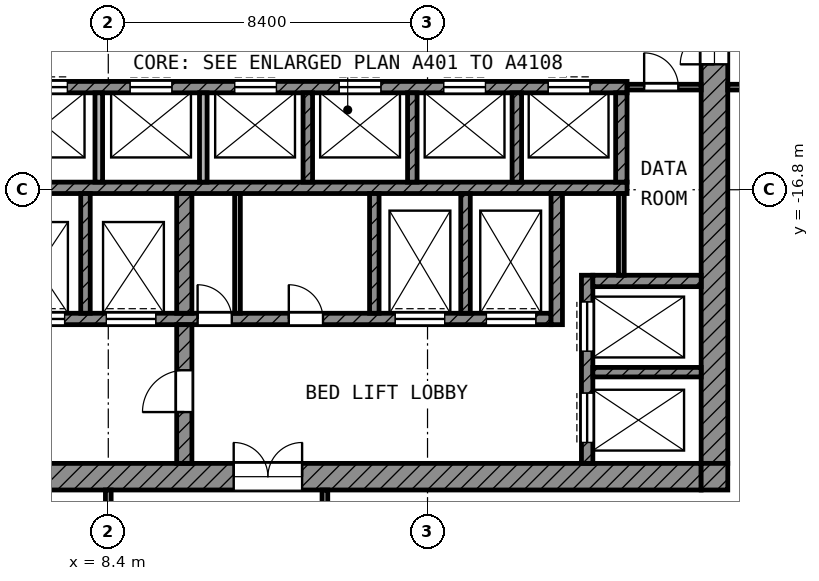
"""IFC4 building model, lengths in metres.
Left out: names, types, materials, properties, quantities, classifications, styles, units other than length and angle.
Written with IfcOpenShell. Run it as: python <this file> out.ifc"""

import sys

from ifc_helpers import new_model, si_unit, direction, frame, frame_2d, origin, place, context, subcontext, project, spatial, rectangle, extrude, element, fill, save


model = new_model("IFC4")
c1 = context("Model", 3, precision=1e-05, world=origin(), true_north=direction((0.0, 1.0)))
c2 = subcontext(c1, "Body", "Model", "MODEL_VIEW")
j1 = project(units=[si_unit("LENGTHUNIT", "METRE"), si_unit("PLANEANGLEUNIT", "RADIAN")], contexts=[c1])
p1 = place(None, origin())
s1 = spatial("IfcSite", under=j1, at=p1, CompositionType="ELEMENT")
p2 = place(p1, origin())
s2 = spatial("IfcBuilding", under=s1, at=p2, CompositionType="ELEMENT")
p3 = place(p2, frame((0.0, 0.0, 277.6)))
s3 = spatial("IfcBuildingStorey", under=s2, at=p3, CompositionType="ELEMENT", Elevation=277.6)
p4 = place(p3, frame((24.35, -24.0, 0.0), z_axis=(0.0, 0.0, 1.0), x_axis=(0.0, 1.0, 0.0)))
e1 = element("IfcWall", 1, at=p4, inside=s3, PredefinedType="SHEAR", context=c2, shape_type="SweptSolid", body=[
    extrude(rectangle(XDim=18.6, YDim=0.7, at=frame_2d((9.3, 0.0))), origin(), (0.0, 0.0, 1.0), 3.6),
])
p5 = place(p4, frame((10.5, 0.0, 0.0)))
e2 = element("IfcOpeningElement", 2, at=p5, cuts=e1, PredefinedType="OPENING", context=c2, shape_type="SweptSolid", body=[
    extrude(rectangle(XDim=1.8, YDim=2.1, at=frame_2d((0.9, 1.05))), frame((0.0, 0.36, 0.0), z_axis=(0.0, -1.0, 0.0), x_axis=(1.0, 0.0, 0.0)), (0.0, 0.0, 1.0), 0.72),
])
p6 = place(p3, frame((5.4, -24.35, 0.0), z_axis=(0.0, 0.0, 1.0), x_axis=(1.0, 0.0, 0.0)))
e3 = element("IfcWall", 3, at=p6, inside=s3, PredefinedType="SHEAR", context=c2, shape_type="SweptSolid", body=[
    extrude(rectangle(XDim=18.6, YDim=0.7, at=frame_2d((9.3, 0.0))), origin(), (0.0, 0.0, 1.0), 3.6),
])
p7 = place(p6, frame((6.3, 0.0, 0.0)))
e4 = element("IfcOpeningElement", 4, at=p7, cuts=e3, PredefinedType="OPENING", context=c2, shape_type="SweptSolid", body=[
    extrude(rectangle(XDim=1.8, YDim=2.1, at=frame_2d((0.9, 1.05))), frame((0.0, 0.36, 0.0), z_axis=(0.0, -1.0, 0.0), x_axis=(1.0, 0.0, 0.0)), (0.0, 0.0, 1.0), 0.72),
])
p8 = place(p3, frame((24.35, -24.7, 0.0), z_axis=(0.0, 0.0, 1.0), x_axis=(0.0, 1.0, 0.0)))
e5 = element("IfcWall", 5, at=p8, inside=s3, PredefinedType="SHEAR", context=c2, shape_type="SweptSolid", body=[
    extrude(rectangle(XDim=0.7, YDim=0.7, at=frame_2d((0.35, 0.0))), origin(), (0.0, 0.0, 1.0), 3.6),
])
p9 = place(p3, frame((5.4, -14.1, 0.0), z_axis=(0.0, 0.0, 1.0), x_axis=(1.0, 0.0, 0.0)))
e6 = element("IfcWall", 6, at=p9, inside=s3, PredefinedType="SHEAR", context=c2, shape_type="SweptSolid", body=[
    extrude(rectangle(XDim=16.65, YDim=0.3, at=frame_2d((8.325, 0.0))), origin(), (0.0, 0.0, 1.0), 3.6),
])
p10 = place(p9, frame((0.825, 0.0, 0.0)))
e7 = element("IfcOpeningElement", 7, at=p10, cuts=e6, PredefinedType="OPENING", context=c2, shape_type="SweptSolid", body=[
    extrude(rectangle(XDim=1.1, YDim=2.1, at=frame_2d((0.55, 1.05))), frame((0.0, 0.16, 0.0), z_axis=(0.0, -1.0, 0.0), x_axis=(1.0, 0.0, 0.0)), (0.0, 0.0, 1.0), 0.32),
])
p11 = place(p9, frame((3.575, 0.0, 0.0)))
e8 = element("IfcOpeningElement", 8, at=p11, cuts=e6, PredefinedType="OPENING", context=c2, shape_type="SweptSolid", body=[
    extrude(rectangle(XDim=1.1, YDim=2.1, at=frame_2d((0.55, 1.05))), frame((0.0, 0.16, 0.0), z_axis=(0.0, -1.0, 0.0), x_axis=(1.0, 0.0, 0.0)), (0.0, 0.0, 1.0), 0.32),
])
p12 = place(p9, frame((6.325, 0.0, 0.0)))
e9 = element("IfcOpeningElement", 9, at=p12, cuts=e6, PredefinedType="OPENING", context=c2, shape_type="SweptSolid", body=[
    extrude(rectangle(XDim=1.1, YDim=2.1, at=frame_2d((0.55, 1.05))), frame((0.0, 0.16, 0.0), z_axis=(0.0, -1.0, 0.0), x_axis=(1.0, 0.0, 0.0)), (0.0, 0.0, 1.0), 0.32),
])
p13 = place(p9, frame((9.075, 0.0, 0.0)))
e10 = element("IfcOpeningElement", 10, at=p13, cuts=e6, PredefinedType="OPENING", context=c2, shape_type="SweptSolid", body=[
    extrude(rectangle(XDim=1.1, YDim=2.1, at=frame_2d((0.55, 1.05))), frame((0.0, 0.16, 0.0), z_axis=(0.0, -1.0, 0.0), x_axis=(1.0, 0.0, 0.0)), (0.0, 0.0, 1.0), 0.32),
])
p14 = place(p9, frame((11.825, 0.0, 0.0)))
e11 = element("IfcOpeningElement", 11, at=p14, cuts=e6, PredefinedType="OPENING", context=c2, shape_type="SweptSolid", body=[
    extrude(rectangle(XDim=1.1, YDim=2.1, at=frame_2d((0.55, 1.05))), frame((0.0, 0.16, 0.0), z_axis=(0.0, -1.0, 0.0), x_axis=(1.0, 0.0, 0.0)), (0.0, 0.0, 1.0), 0.32),
])
p15 = place(p9, frame((14.575, 0.0, 0.0)))
e12 = element("IfcOpeningElement", 12, at=p15, cuts=e6, PredefinedType="OPENING", context=c2, shape_type="SweptSolid", body=[
    extrude(rectangle(XDim=1.1, YDim=2.1, at=frame_2d((0.55, 1.05))), frame((0.0, 0.16, 0.0), z_axis=(0.0, -1.0, 0.0), x_axis=(1.0, 0.0, 0.0)), (0.0, 0.0, 1.0), 0.32),
])
p16 = place(p3, frame((5.4, -16.75, 0.0), z_axis=(0.0, 0.0, 1.0), x_axis=(1.0, 0.0, 0.0)))
e13 = element("IfcWall", 13, at=p16, inside=s3, PredefinedType="SHEAR", context=c2, shape_type="SweptSolid", body=[
    extrude(rectangle(XDim=16.65, YDim=0.3, at=frame_2d((8.325, 0.0))), origin(), (0.0, 0.0, 1.0), 3.6),
])
p17 = place(p3, frame((5.4, -20.2, 0.0), z_axis=(0.0, 0.0, 1.0), x_axis=(1.0, 0.0, 0.0)))
e14 = element("IfcWall", 14, at=p17, inside=s3, PredefinedType="SHEAR", context=c2, shape_type="SweptSolid", body=[
    extrude(rectangle(XDim=14.65, YDim=0.3, at=frame_2d((7.325, 0.0))), origin(), (0.0, 0.0, 1.0), 3.6),
])
p18 = place(p17, frame((10.55, 0.0, 0.0)))
e15 = element("IfcOpeningElement", 15, at=p18, cuts=e14, PredefinedType="OPENING", context=c2, shape_type="SweptSolid", body=[
    extrude(rectangle(XDim=1.3, YDim=2.1, at=frame_2d((0.65, 1.05))), frame((0.0, 0.16, 0.0), z_axis=(0.0, -1.0, 0.0), x_axis=(1.0, 0.0, 0.0)), (0.0, 0.0, 1.0), 0.32),
])
p19 = place(p17, frame((12.95, 0.0, 0.0)))
e16 = element("IfcOpeningElement", 16, at=p19, cuts=e14, PredefinedType="OPENING", context=c2, shape_type="SweptSolid", body=[
    extrude(rectangle(XDim=1.3, YDim=2.1, at=frame_2d((0.65, 1.05))), frame((0.0, 0.16, 0.0), z_axis=(0.0, -1.0, 0.0), x_axis=(1.0, 0.0, 0.0)), (0.0, 0.0, 1.0), 0.32),
])
p20 = place(p17, frame((0.55, 0.0, 0.0)))
e17 = element("IfcOpeningElement", 17, at=p20, cuts=e14, PredefinedType="OPENING", context=c2, shape_type="SweptSolid", body=[
    extrude(rectangle(XDim=1.3, YDim=2.1, at=frame_2d((0.65, 1.05))), frame((0.0, 0.16, 0.0), z_axis=(0.0, -1.0, 0.0), x_axis=(1.0, 0.0, 0.0)), (0.0, 0.0, 1.0), 0.32),
])
p21 = place(p17, frame((2.95, 0.0, 0.0)))
e18 = element("IfcOpeningElement", 18, at=p21, cuts=e14, PredefinedType="OPENING", context=c2, shape_type="SweptSolid", body=[
    extrude(rectangle(XDim=1.3, YDim=2.1, at=frame_2d((0.65, 1.05))), frame((0.0, 0.16, 0.0), z_axis=(0.0, -1.0, 0.0), x_axis=(1.0, 0.0, 0.0)), (0.0, 0.0, 1.0), 0.32),
])
p22 = place(p17, frame((5.35, 0.0, 0.0)))
e19 = element("IfcOpeningElement", 19, at=p22, cuts=e14, PredefinedType="OPENING", context=c2, shape_type="SweptSolid", body=[
    extrude(rectangle(XDim=0.9, YDim=2.1, at=frame_2d((0.45, 1.05))), frame((0.0, 0.16, 0.0), z_axis=(0.0, -1.0, 0.0), x_axis=(1.0, 0.0, 0.0)), (0.0, 0.0, 1.0), 0.32),
])
p23 = place(p17, frame((7.75, 0.0, 0.0)))
e20 = element("IfcOpeningElement", 20, at=p23, cuts=e14, PredefinedType="OPENING", context=c2, shape_type="SweptSolid", body=[
    extrude(rectangle(XDim=0.9, YDim=2.1, at=frame_2d((0.45, 1.05))), frame((0.0, 0.16, 0.0), z_axis=(0.0, -1.0, 0.0), x_axis=(1.0, 0.0, 0.0)), (0.0, 0.0, 1.0), 0.32),
])
p24 = place(p3, frame((10.4, -24.0, 0.0), z_axis=(0.0, 0.0, 1.0), x_axis=(0.0, 1.0, 0.0)))
e21 = element("IfcWall", 21, at=p24, inside=s3, PredefinedType="SHEAR", context=c2, shape_type="SweptSolid", body=[
    extrude(rectangle(XDim=3.65, YDim=0.4, at=frame_2d((1.825, 0.0))), origin(), (0.0, 0.0, 1.0), 3.6),
])
p25 = place(p24, frame((1.35, 0.0, 0.0)))
e22 = element("IfcOpeningElement", 22, at=p25, cuts=e21, PredefinedType="OPENING", context=c2, shape_type="SweptSolid", body=[
    extrude(rectangle(XDim=1.1, YDim=2.1, at=frame_2d((0.55, 1.05))), frame((0.0, 0.21, 0.0), z_axis=(0.0, -1.0, 0.0), x_axis=(1.0, 0.0, 0.0)), (0.0, 0.0, 1.0), 0.42),
])
p26 = place(p3, frame((10.4, -20.05, 0.0), z_axis=(0.0, 0.0, 1.0), x_axis=(0.0, 1.0, 0.0)))
e23 = element("IfcWall", 23, at=p26, inside=s3, PredefinedType="SHEAR", context=c2, shape_type="SweptSolid", body=[
    extrude(rectangle(XDim=3.15, YDim=0.4, at=frame_2d((1.575, 0.0))), origin(), (0.0, 0.0, 1.0), 3.6),
])
p27 = place(p3, frame((20.2, -20.35, 0.0), z_axis=(0.0, 0.0, 1.0), x_axis=(0.0, 1.0, 0.0)))
e24 = element("IfcWall", 24, at=p27, inside=s3, PredefinedType="SHEAR", context=c2, shape_type="SweptSolid", body=[
    extrude(rectangle(XDim=3.45, YDim=0.3, at=frame_2d((1.725, 0.0))), origin(), (0.0, 0.0, 1.0), 3.6),
])
p28 = place(p3, frame((21.9, -16.6, 0.0), z_axis=(0.0, 0.0, 1.0), x_axis=(0.0, 1.0, 0.0)))
e25 = element("IfcWall", 25, at=p28, inside=s3, PredefinedType="SHEAR", context=c2, shape_type="SweptSolid", body=[
    extrude(rectangle(XDim=2.35, YDim=0.3, at=frame_2d((1.175, 0.0))), origin(), (0.0, 0.0, 1.0), 3.6),
])
p29 = place(p3, frame((21.15, -19.2, 0.0), z_axis=(0.0, 0.0, 1.0), x_axis=(1.0, 0.0, 0.0)))
e26 = element("IfcWall", 26, at=p29, inside=s3, PredefinedType="SHEAR", context=c2, shape_type="SweptSolid", body=[
    extrude(rectangle(XDim=2.85, YDim=0.3, at=frame_2d((1.425, 0.0))), origin(), (0.0, 0.0, 1.0), 3.6),
])
p30 = place(p3, frame((21.0, -24.0, 0.0), z_axis=(0.0, 0.0, 1.0), x_axis=(0.0, 1.0, 0.0)))
e27 = element("IfcWall", 27, at=p30, inside=s3, PredefinedType="SHEAR", context=c2, shape_type="SweptSolid", body=[
    extrude(rectangle(XDim=4.95, YDim=0.3, at=frame_2d((2.475, 0.0))), origin(), (0.0, 0.0, 1.0), 3.6),
])
p31 = place(p30, frame((2.95, 0.0, 0.0)))
e28 = element("IfcOpeningElement", 28, at=p31, cuts=e27, PredefinedType="OPENING", context=c2, shape_type="SweptSolid", body=[
    extrude(rectangle(XDim=1.3, YDim=2.1, at=frame_2d((0.65, 1.05))), frame((0.0, 0.16, 0.0), z_axis=(0.0, -1.0, 0.0), x_axis=(1.0, 0.0, 0.0)), (0.0, 0.0, 1.0), 0.32),
])
p32 = place(p30, frame((0.55, 0.0, 0.0)))
e29 = element("IfcOpeningElement", 29, at=p32, cuts=e27, PredefinedType="OPENING", context=c2, shape_type="SweptSolid", body=[
    extrude(rectangle(XDim=1.3, YDim=2.1, at=frame_2d((0.65, 1.05))), frame((0.0, 0.16, 0.0), z_axis=(0.0, -1.0, 0.0), x_axis=(1.0, 0.0, 0.0)), (0.0, 0.0, 1.0), 0.32),
])
p33 = place(p3, frame((21.15, -21.6, 0.0), z_axis=(0.0, 0.0, 1.0), x_axis=(1.0, 0.0, 0.0)))
e30 = element("IfcWall", 30, at=p33, inside=s3, PredefinedType="SHEAR", context=c2, shape_type="SweptSolid", body=[
    extrude(rectangle(XDim=2.85, YDim=0.25, at=frame_2d((1.425, 0.0))), origin(), (0.0, 0.0, 1.0), 3.6),
])
for number, where, z_axis, x_axis in (
    (31, (7.8, -20.05, 0.0), (0.0, 0.0, 1.0), (0.0, 1.0, 0.0)),
    (32, (15.4, -20.05, 0.0), (0.0, 0.0, 1.0), (0.0, 1.0, 0.0)),
    (33, (17.8, -20.05, 0.0), (0.0, 0.0, 1.0), (0.0, 1.0, 0.0)),
):
    element("IfcWall", number, at=place(p3, frame(where, z_axis=z_axis, x_axis=x_axis)), inside=s3, PredefinedType="SHEAR", context=c2, shape_type="SweptSolid", body=[
        extrude(rectangle(XDim=3.15, YDim=0.25, at=frame_2d((1.575, 0.0))), origin(), (0.0, 0.0, 1.0), 3.6),
    ])
for number, where, z_axis, x_axis in (
    (34, (8.15, -16.6, 0.0), (0.0, 0.0, 1.0), (0.0, 1.0, 0.0)),
    (35, (10.9, -16.6, 0.0), (0.0, 0.0, 1.0), (0.0, 1.0, 0.0)),
):
    element("IfcWall", number, at=place(p3, frame(where, z_axis=z_axis, x_axis=x_axis)), inside=s3, PredefinedType="PARTITIONING", context=c2, shape_type="SweptSolid", body=[
        extrude(rectangle(XDim=2.35, YDim=0.2, at=frame_2d((1.175, 0.0))), origin(), (0.0, 0.0, 1.0), 3.6),
    ])
for number, where, z_axis, x_axis in (
    (36, (13.65, -16.6, 0.0), (0.0, 0.0, 1.0), (0.0, 1.0, 0.0)),
    (37, (16.4, -16.6, 0.0), (0.0, 0.0, 1.0), (0.0, 1.0, 0.0)),
    (38, (19.15, -16.6, 0.0), (0.0, 0.0, 1.0), (0.0, 1.0, 0.0)),
):
    element("IfcWall", number, at=place(p3, frame(where, z_axis=z_axis, x_axis=x_axis)), inside=s3, PredefinedType="SHEAR", context=c2, shape_type="SweptSolid", body=[
        extrude(rectangle(XDim=2.35, YDim=0.25, at=frame_2d((1.175, 0.0))), origin(), (0.0, 0.0, 1.0), 3.6),
    ])
p34 = place(p3, frame((21.9, -19.05, 0.0), z_axis=(0.0, 0.0, 1.0), x_axis=(0.0, 1.0, 0.0)))
e39 = element("IfcWall", 39, at=p34, inside=s3, PredefinedType="PARTITIONING", context=c2, shape_type="SweptSolid", body=[
    extrude(rectangle(XDim=2.15, YDim=0.15, at=frame_2d((1.075, 0.0))), origin(), (0.0, 0.0, 1.0), 3.6),
])
p35 = place(p3, frame((22.05, -14.1, 0.0), z_axis=(0.0, 0.0, 1.0), x_axis=(1.0, 0.0, 0.0)))
e40 = element("IfcWall", 40, at=p35, inside=s3, PredefinedType="PARTITIONING", context=c2, shape_type="SweptSolid", body=[
    extrude(rectangle(XDim=1.95, YDim=0.15, at=frame_2d((0.975, 0.0))), origin(), (0.0, 0.0, 1.0), 3.6),
])
p36 = place(p35, frame((0.45, 0.0, 0.0)))
e41 = element("IfcOpeningElement", 41, at=p36, cuts=e40, PredefinedType="OPENING", context=c2, shape_type="SweptSolid", body=[
    extrude(rectangle(XDim=0.9, YDim=2.1, at=frame_2d((0.45, 1.05))), frame((0.0, 0.085, 0.0), z_axis=(0.0, -1.0, 0.0), x_axis=(1.0, 0.0, 0.0)), (0.0, 0.0, 1.0), 0.17),
])
p37 = place(p3, frame((11.8, -20.05, 0.0), z_axis=(0.0, 0.0, 1.0), x_axis=(0.0, 1.0, 0.0)))
e42 = element("IfcWall", 42, at=p37, inside=s3, PredefinedType="PARTITIONING", context=c2, shape_type="SweptSolid", body=[
    extrude(rectangle(XDim=3.15, YDim=0.15, at=frame_2d((1.575, 0.0))), origin(), (0.0, 0.0, 1.0), 3.6),
])
p38 = place(p3, frame((24.7, -14.1, 0.0), z_axis=(0.0, 0.0, 1.0), x_axis=(1.0, 0.0, 0.0)))
e43 = element("IfcWall", 43, at=p38, inside=s3, PredefinedType="PARTITIONING", context=c2, shape_type="SweptSolid", body=[
    extrude(rectangle(XDim=4.625, YDim=0.15, at=frame_2d((2.312, 0.0))), origin(), (0.0, 0.0, 1.0), 3.6),
])
p39 = place(p38, frame((2.1, 0.0, 0.0)))
e44 = element("IfcOpeningElement", 44, at=p39, cuts=e43, PredefinedType="OPENING", context=c2, shape_type="SweptSolid", body=[
    extrude(rectangle(XDim=1.0, YDim=2.1, at=frame_2d((0.5, 1.05))), frame((0.0, 0.085, 0.0), z_axis=(0.0, -1.0, 0.0), x_axis=(1.0, 0.0, 0.0)), (0.0, 0.0, 1.0), 0.17),
])
p40 = place(p3, frame((8.4, -31.957, 0.0), z_axis=(0.0, 0.0, 1.0), x_axis=(0.0, 1.0, 0.0)))
e45 = element("IfcWall", 45, at=p40, inside=s3, PredefinedType="PARTITIONING", context=c2, shape_type="SweptSolid", body=[
    extrude(rectangle(XDim=7.257, YDim=0.15, at=frame_2d((3.628, 0.0))), origin(), (0.0, 0.0, 1.0), 3.6),
])
p41 = place(p40, frame((4.207, 0.0, 0.0)))
e46 = element("IfcOpeningElement", 46, at=p41, cuts=e45, PredefinedType="OPENING", context=c2, shape_type="SweptSolid", body=[
    extrude(rectangle(XDim=0.9, YDim=2.1, at=frame_2d((0.45, 1.05))), frame((0.0, 0.085, 0.0), z_axis=(0.0, -1.0, 0.0), x_axis=(1.0, 0.0, 0.0)), (0.0, 0.0, 1.0), 0.17),
])
p42 = place(p3, frame((14.1, -29.325, 0.0), z_axis=(0.0, 0.0, 1.0), x_axis=(0.0, 1.0, 0.0)))
e47 = element("IfcWall", 47, at=p42, inside=s3, PredefinedType="PARTITIONING", context=c2, shape_type="SweptSolid", body=[
    extrude(rectangle(XDim=4.625, YDim=0.15, at=frame_2d((2.312, 0.0))), origin(), (0.0, 0.0, 1.0), 3.6),
])
p43 = place(p10, origin())
e48 = element("IfcDoor", 48, at=p43, inside=s3, OperationType="DOUBLE_DOOR_SLIDING", PredefinedType="DOOR", context=c2, shape_type="SweptSolid", body=[
    extrude(rectangle(XDim=1.1, YDim=2.1, at=frame_2d((0.55, 1.05))), frame((0.0, 0.025, 0.0), z_axis=(0.0, -1.0, 0.0), x_axis=(1.0, 0.0, 0.0)), (0.0, 0.0, 1.0), 0.05),
])
fill(e7, e48)
p44 = place(p11, origin())
e49 = element("IfcDoor", 49, at=p44, inside=s3, OperationType="DOUBLE_DOOR_SLIDING", PredefinedType="DOOR", context=c2, shape_type="SweptSolid", body=[
    extrude(rectangle(XDim=1.1, YDim=2.1, at=frame_2d((0.55, 1.05))), frame((0.0, 0.025, 0.0), z_axis=(0.0, -1.0, 0.0), x_axis=(1.0, 0.0, 0.0)), (0.0, 0.0, 1.0), 0.05),
])
fill(e8, e49)
p45 = place(p12, origin())
e50 = element("IfcDoor", 50, at=p45, inside=s3, OperationType="DOUBLE_DOOR_SLIDING", PredefinedType="DOOR", context=c2, shape_type="SweptSolid", body=[
    extrude(rectangle(XDim=1.1, YDim=2.1, at=frame_2d((0.55, 1.05))), frame((0.0, 0.025, 0.0), z_axis=(0.0, -1.0, 0.0), x_axis=(1.0, 0.0, 0.0)), (0.0, 0.0, 1.0), 0.05),
])
fill(e9, e50)
p46 = place(p13, origin())
e51 = element("IfcDoor", 51, at=p46, inside=s3, OperationType="DOUBLE_DOOR_SLIDING", PredefinedType="DOOR", context=c2, shape_type="SweptSolid", body=[
    extrude(rectangle(XDim=1.1, YDim=2.1, at=frame_2d((0.55, 1.05))), frame((0.0, 0.025, 0.0), z_axis=(0.0, -1.0, 0.0), x_axis=(1.0, 0.0, 0.0)), (0.0, 0.0, 1.0), 0.05),
])
fill(e10, e51)
p47 = place(p14, origin())
e52 = element("IfcDoor", 52, at=p47, inside=s3, OperationType="DOUBLE_DOOR_SLIDING", PredefinedType="DOOR", context=c2, shape_type="SweptSolid", body=[
    extrude(rectangle(XDim=1.1, YDim=2.1, at=frame_2d((0.55, 1.05))), frame((0.0, 0.025, 0.0), z_axis=(0.0, -1.0, 0.0), x_axis=(1.0, 0.0, 0.0)), (0.0, 0.0, 1.0), 0.05),
])
fill(e11, e52)
p48 = place(p15, origin())
e53 = element("IfcDoor", 53, at=p48, inside=s3, OperationType="DOUBLE_DOOR_SLIDING", PredefinedType="DOOR", context=c2, shape_type="SweptSolid", body=[
    extrude(rectangle(XDim=1.1, YDim=2.1, at=frame_2d((0.55, 1.05))), frame((0.0, 0.025, 0.0), z_axis=(0.0, -1.0, 0.0), x_axis=(1.0, 0.0, 0.0)), (0.0, 0.0, 1.0), 0.05),
])
fill(e12, e53)
p49 = place(p31, origin())
e54 = element("IfcDoor", 54, at=p49, inside=s3, OperationType="DOUBLE_DOOR_SLIDING", PredefinedType="DOOR", context=c2, shape_type="SweptSolid", body=[
    extrude(rectangle(XDim=1.3, YDim=2.1, at=frame_2d((0.65, 1.05))), frame((0.0, 0.025, 0.0), z_axis=(0.0, -1.0, 0.0), x_axis=(1.0, 0.0, 0.0)), (0.0, 0.0, 1.0), 0.05),
])
fill(e28, e54)
p50 = place(p32, origin())
e55 = element("IfcDoor", 55, at=p50, inside=s3, OperationType="DOUBLE_DOOR_SLIDING", PredefinedType="DOOR", context=c2, shape_type="SweptSolid", body=[
    extrude(rectangle(XDim=1.3, YDim=2.1, at=frame_2d((0.65, 1.05))), frame((0.0, 0.025, 0.0), z_axis=(0.0, -1.0, 0.0), x_axis=(1.0, 0.0, 0.0)), (0.0, 0.0, 1.0), 0.05),
])
fill(e29, e55)
p51 = place(p18, origin())
e56 = element("IfcDoor", 56, at=p51, inside=s3, OperationType="DOUBLE_DOOR_SLIDING", PredefinedType="DOOR", context=c2, shape_type="SweptSolid", body=[
    extrude(rectangle(XDim=1.3, YDim=2.1, at=frame_2d((0.65, 1.05))), frame((0.0, 0.025, 0.0), z_axis=(0.0, -1.0, 0.0), x_axis=(1.0, 0.0, 0.0)), (0.0, 0.0, 1.0), 0.05),
])
fill(e15, e56)
p52 = place(p19, origin())
e57 = element("IfcDoor", 57, at=p52, inside=s3, OperationType="DOUBLE_DOOR_SLIDING", PredefinedType="DOOR", context=c2, shape_type="SweptSolid", body=[
    extrude(rectangle(XDim=1.3, YDim=2.1, at=frame_2d((0.65, 1.05))), frame((0.0, 0.025, 0.0), z_axis=(0.0, -1.0, 0.0), x_axis=(1.0, 0.0, 0.0)), (0.0, 0.0, 1.0), 0.05),
])
fill(e16, e57)
p53 = place(p20, origin())
e58 = element("IfcDoor", 58, at=p53, inside=s3, OperationType="DOUBLE_DOOR_SLIDING", PredefinedType="DOOR", context=c2, shape_type="SweptSolid", body=[
    extrude(rectangle(XDim=1.3, YDim=2.1, at=frame_2d((0.65, 1.05))), frame((0.0, 0.025, 0.0), z_axis=(0.0, -1.0, 0.0), x_axis=(1.0, 0.0, 0.0)), (0.0, 0.0, 1.0), 0.05),
])
fill(e17, e58)
p54 = place(p21, origin())
e59 = element("IfcDoor", 59, at=p54, inside=s3, OperationType="DOUBLE_DOOR_SLIDING", PredefinedType="DOOR", context=c2, shape_type="SweptSolid", body=[
    extrude(rectangle(XDim=1.3, YDim=2.1, at=frame_2d((0.65, 1.05))), frame((0.0, 0.025, 0.0), z_axis=(0.0, -1.0, 0.0), x_axis=(1.0, 0.0, 0.0)), (0.0, 0.0, 1.0), 0.05),
])
fill(e18, e59)
p55 = place(p25, origin())
e60 = element("IfcDoor", 60, at=p55, inside=s3, OperationType="SINGLE_SWING_LEFT", PredefinedType="DOOR", context=c2, shape_type="SweptSolid", body=[
    extrude(rectangle(XDim=1.1, YDim=2.1, at=frame_2d((0.55, 1.05))), frame((0.0, 0.025, 0.0), z_axis=(0.0, -1.0, 0.0), x_axis=(1.0, 0.0, 0.0)), (0.0, 0.0, 1.0), 0.05),
])
fill(e22, e60)
p56 = place(p5, origin())
e61 = element("IfcDoor", 61, at=p56, inside=s3, OperationType="DOUBLE_DOOR_SINGLE_SWING", PredefinedType="DOOR", context=c2, shape_type="SweptSolid", body=[
    extrude(rectangle(XDim=1.8, YDim=2.1, at=frame_2d((0.9, 1.05))), frame((0.0, 0.025, 0.0), z_axis=(0.0, -1.0, 0.0), x_axis=(1.0, 0.0, 0.0)), (0.0, 0.0, 1.0), 0.05),
])
fill(e2, e61)
p57 = place(p7, origin())
e62 = element("IfcDoor", 62, at=p57, inside=s3, OperationType="DOUBLE_DOOR_SINGLE_SWING", PredefinedType="DOOR", context=c2, shape_type="SweptSolid", body=[
    extrude(rectangle(XDim=1.8, YDim=2.1, at=frame_2d((0.9, 1.05))), frame((0.0, 0.025, 0.0), z_axis=(0.0, -1.0, 0.0), x_axis=(1.0, 0.0, 0.0)), (0.0, 0.0, 1.0), 0.05),
])
fill(e4, e62)
p58 = place(p36, origin())
e63 = element("IfcDoor", 63, at=p58, inside=s3, OperationType="SINGLE_SWING_LEFT", PredefinedType="DOOR", context=c2, shape_type="SweptSolid", body=[
    extrude(rectangle(XDim=0.9, YDim=2.1, at=frame_2d((0.45, 1.05))), frame((0.0, 0.025, 0.0), z_axis=(0.0, -1.0, 0.0), x_axis=(1.0, 0.0, 0.0)), (0.0, 0.0, 1.0), 0.05),
])
fill(e41, e63)
p59 = place(p22, origin())
e64 = element("IfcDoor", 64, at=p59, inside=s3, OperationType="SINGLE_SWING_LEFT", PredefinedType="DOOR", context=c2, shape_type="SweptSolid", body=[
    extrude(rectangle(XDim=0.9, YDim=2.1, at=frame_2d((0.45, 1.05))), frame((0.0, 0.025, 0.0), z_axis=(0.0, -1.0, 0.0), x_axis=(1.0, 0.0, 0.0)), (0.0, 0.0, 1.0), 0.05),
])
fill(e19, e64)
p60 = place(p23, origin())
e65 = element("IfcDoor", 65, at=p60, inside=s3, OperationType="SINGLE_SWING_LEFT", PredefinedType="DOOR", context=c2, shape_type="SweptSolid", body=[
    extrude(rectangle(XDim=0.9, YDim=2.1, at=frame_2d((0.45, 1.05))), frame((0.0, 0.025, 0.0), z_axis=(0.0, -1.0, 0.0), x_axis=(1.0, 0.0, 0.0)), (0.0, 0.0, 1.0), 0.05),
])
fill(e20, e65)
save(model, sys.argv[1])
